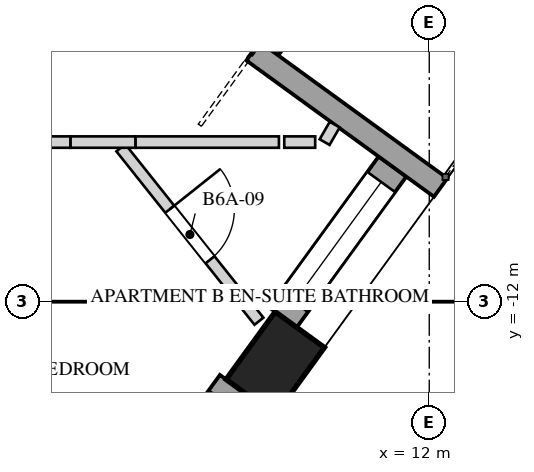
"""IFC4 building model, lengths in metres.
Left out: names, types, materials, properties, quantities, classifications, styles, units other than length and angle.
Written with IfcOpenShell. Run it as: python <this file> out.ifc"""

import sys

from ifc_helpers import new_model, si_unit, direction, frame, frame_2d, origin, origin_2d, place, context, subcontext, project, spatial, rectangle, extrude, element, fill, save


model = new_model("IFC4")
c1 = context("Model", 3, precision=1e-05, world=origin(), true_north=direction((0.0, 1.0)))
c2 = subcontext(c1, "Body", "Model", "MODEL_VIEW")
j1 = project(units=[si_unit("LENGTHUNIT", "METRE"), si_unit("PLANEANGLEUNIT", "RADIAN")], contexts=[c1])
p1 = place(None, origin())
s1 = spatial("IfcSite", under=j1, at=p1, CompositionType="ELEMENT")
p2 = place(p1, origin())
s2 = spatial("IfcBuilding", under=s1, at=p2, CompositionType="ELEMENT")
p3 = place(p2, frame((0.0, 0.0, 245.2)))
s3 = spatial("IfcBuildingStorey", under=s2, at=p3, CompositionType="ELEMENT", Elevation=245.2)
p4 = place(p3, frame((9.974, -12.813, 0.0), z_axis=(0.0, 0.0, 1.0), x_axis=(0.587785252292, 0.809016994375, 0.0)))
e1 = element("IfcColumn", 1, at=p4, inside=s3, PredefinedType="COLUMN", context=c2, shape_type="SweptSolid", body=[
    extrude(rectangle(XDim=1.1, YDim=0.8, at=origin_2d()), origin(), (0.0, 0.0, 1.0), 4.0),
])
p5 = place(p3, frame((7.987, -15.08, 0.0), z_axis=(0.0, 0.0, 1.0), x_axis=(0.587792773076, 0.809011530152, 0.0)))
e2 = element("IfcWall", 2, at=p5, inside=s3, PredefinedType="SOLIDWALL", context=c2, shape_type="SweptSolid", body=[
    extrude(rectangle(XDim=2.452, YDim=0.45, at=frame_2d((1.226, 0.0))), origin(), (0.0, 0.0, 1.0), 3.3),
])
p6 = place(p5, frame((0.251, 0.0, 0.4)))
e3 = element("IfcOpeningElement", 3, at=p6, cuts=e2, PredefinedType="OPENING", context=c2, shape_type="SweptSolid", body=[
    extrude(rectangle(XDim=1.95, YDim=2.75, at=frame_2d((0.975, 1.375))), frame((0.0, 0.235, 0.0), z_axis=(0.0, -1.0, 0.0), x_axis=(1.0, 0.0, 0.0)), (0.0, 0.0, 1.0), 0.47),
])
p7 = place(p3, frame((10.074, -12.206, 0.0), z_axis=(0.0, 0.0, 1.0), x_axis=(0.587792773076, 0.809011530152, 0.0)))
e4 = element("IfcWall", 4, at=p7, inside=s3, PredefinedType="SOLIDWALL", context=c2, shape_type="SweptSolid", body=[
    extrude(rectangle(XDim=2.452, YDim=0.45, at=frame_2d((1.226, 0.0))), origin(), (0.0, 0.0, 1.0), 3.3),
])
p8 = place(p7, frame((0.251, 0.0, 0.4)))
e5 = element("IfcOpeningElement", 5, at=p8, cuts=e4, PredefinedType="OPENING", context=c2, shape_type="SweptSolid", body=[
    extrude(rectangle(XDim=1.95, YDim=2.75, at=frame_2d((0.975, 1.375))), frame((0.0, 0.235, 0.0), z_axis=(0.0, -1.0, 0.0), x_axis=(1.0, 0.0, 0.0)), (0.0, 0.0, 1.0), 0.47),
])
p9 = place(p3, frame((9.892, -8.672, 0.0), z_axis=(0.0, 0.0, 1.0), x_axis=(0.587833242688, 0.808982125137, 0.0)))
e6 = element("IfcWall", 6, at=p9, inside=s3, PredefinedType="SOLIDWALL", context=c2, shape_type="SweptSolid", body=[
    extrude(rectangle(XDim=2.402, YDim=0.3, at=frame_2d((1.201, 0.0))), origin(), (0.0, 0.0, 1.0), 3.3),
])
p10 = place(p9, frame((0.351, 0.0, 0.0)))
e7 = element("IfcOpeningElement", 7, at=p10, cuts=e6, PredefinedType="OPENING", context=c2, shape_type="SweptSolid", body=[
    extrude(rectangle(XDim=1.7, YDim=2.5, at=frame_2d((0.85, 1.25))), frame((0.0, 0.16, 0.0), z_axis=(0.0, -1.0, 0.0), x_axis=(1.0, 0.0, 0.0)), (0.0, 0.0, 1.0), 0.32),
])
p11 = place(p3, frame((12.15, -10.498, 0.0), z_axis=(0.0, 0.0, 1.0), x_axis=(-0.80902328748, 0.587776590479, 0.0)))
e8 = element("IfcWall", 8, at=p11, inside=s3, PredefinedType="SOLIDWALL", context=c2, shape_type="SweptSolid", body=[
    extrude(rectangle(XDim=3.05, YDim=0.3, at=frame_2d((1.525, 0.0))), origin(), (0.0, 0.0, 1.0), 3.3),
])
p12 = place(p3, frame((7.943, -9.975, 0.0), z_axis=(0.0, 0.0, 1.0), x_axis=(0.622917295976, -0.782287697956, 0.0)))
e9 = element("IfcWall", 9, at=p12, inside=s3, PredefinedType="PARTITIONING", context=c2, shape_type="SweptSolid", body=[
    extrude(rectangle(XDim=2.917, YDim=0.15, at=frame_2d((1.458, 0.0))), origin(), (0.0, 0.0, 1.0), 2.95),
])
p13 = place(p12, frame((1.033, 0.0, 0.0)))
e10 = element("IfcOpeningElement", 10, at=p13, cuts=e9, PredefinedType="OPENING", context=c2, shape_type="SweptSolid", body=[
    extrude(rectangle(XDim=0.85, YDim=2.4, at=frame_2d((0.425, 1.2))), frame((0.0, 0.085, 0.0), z_axis=(0.0, -1.0, 0.0), x_axis=(1.0, 0.0, 0.0)), (0.0, 0.0, 1.0), 0.17),
])
p14 = place(p3, frame((10.022, -9.9, 0.0), z_axis=(0.0, 0.0, 1.0), x_axis=(-1.0, 0.0, 0.0)))
e11 = element("IfcWall", 11, at=p14, inside=s3, PredefinedType="PARTITIONING", context=c2, shape_type="SweptSolid", body=[
    extrude(rectangle(XDim=1.888, YDim=0.15, at=frame_2d((0.944, 0.0))), origin(), (0.0, 0.0, 1.0), 3.65),
])
p15 = place(p3, frame((8.134, -9.9, 0.0), z_axis=(0.0, 0.0, 1.0), x_axis=(-1.0, 0.0, 0.0)))
e12 = element("IfcWall", 12, at=p15, inside=s3, PredefinedType="PARTITIONING", context=c2, shape_type="SweptSolid", body=[
    extrude(rectangle(XDim=0.855, YDim=0.15, at=frame_2d((0.428, 0.0))), origin(), (0.0, 0.0, 1.0), 2.95),
])
p16 = place(p3, frame((7.279, -9.9, 0.0), z_axis=(0.0, 0.0, 1.0), x_axis=(-1.0, 0.0, 0.0)))
e13 = element("IfcWall", 13, at=p16, inside=s3, PredefinedType="PARTITIONING", context=c2, shape_type="SweptSolid", body=[
    extrude(rectangle(XDim=4.576, YDim=0.15, at=frame_2d((2.288, 0.0))), origin(), (0.0, 0.0, 1.0), 3.65),
])
p17 = place(p16, frame((0.745, 0.0, 0.0)))
e14 = element("IfcOpeningElement", 14, at=p17, cuts=e13, PredefinedType="OPENING", context=c2, shape_type="SweptSolid", body=[
    extrude(rectangle(XDim=0.95, YDim=2.4, at=frame_2d((0.475, 1.2))), frame((0.0, 0.085, 0.0), z_axis=(0.0, -1.0, 0.0), x_axis=(1.0, 0.0, 0.0)), (0.0, 0.0, 1.0), 0.17),
])
p18 = place(p3, frame((10.092, -9.9, 0.0), z_axis=(0.0, 0.0, 1.0), x_axis=(1.0, 0.0, 0.0)))
e15 = element("IfcWall", 15, at=p18, inside=s3, PredefinedType="PARTITIONING", context=c2, shape_type="SweptSolid", body=[
    extrude(rectangle(XDim=0.407, YDim=0.15, at=frame_2d((0.204, 0.0))), origin(), (0.0, 0.0, 1.0), 3.65),
])
p19 = place(p3, frame((10.756, -9.67, 0.0), z_axis=(0.0, 0.0, 1.0), x_axis=(-0.499802134818, -0.866139611167, 0.0)))
e16 = element("IfcWall", 16, at=p19, inside=s3, PredefinedType="PARTITIONING", context=c2, shape_type="SweptSolid", body=[
    extrude(rectangle(XDim=0.265, YDim=0.15, at=frame_2d((0.133, 0.0))), origin(), (0.0, 0.0, 1.0), 3.65),
])
p20 = place(p8, origin())
e17 = element("IfcWindow", 17, at=p20, inside=s3, PartitioningType="SINGLE_PANEL", PredefinedType="WINDOW", context=c2, shape_type="SweptSolid", body=[
    extrude(rectangle(XDim=1.95, YDim=2.75, at=frame_2d((0.975, 1.375))), frame((0.0, 0.03, 0.0), z_axis=(0.0, -1.0, 0.0), x_axis=(1.0, 0.0, 0.0)), (0.0, 0.0, 1.0), 0.06),
])
fill(e5, e17)
p21 = place(p13, origin())
e18 = element("IfcDoor", 18, at=p21, inside=s3, OperationType="SINGLE_SWING_LEFT", PredefinedType="DOOR", context=c2, shape_type="SweptSolid", body=[
    extrude(rectangle(XDim=0.85, YDim=2.4, at=frame_2d((0.425, 1.2))), frame((0.0, 0.025, 0.0), z_axis=(0.0, -1.0, 0.0), x_axis=(1.0, 0.0, 0.0)), (0.0, 0.0, 1.0), 0.05),
])
fill(e10, e18)
save(model, sys.argv[1])
